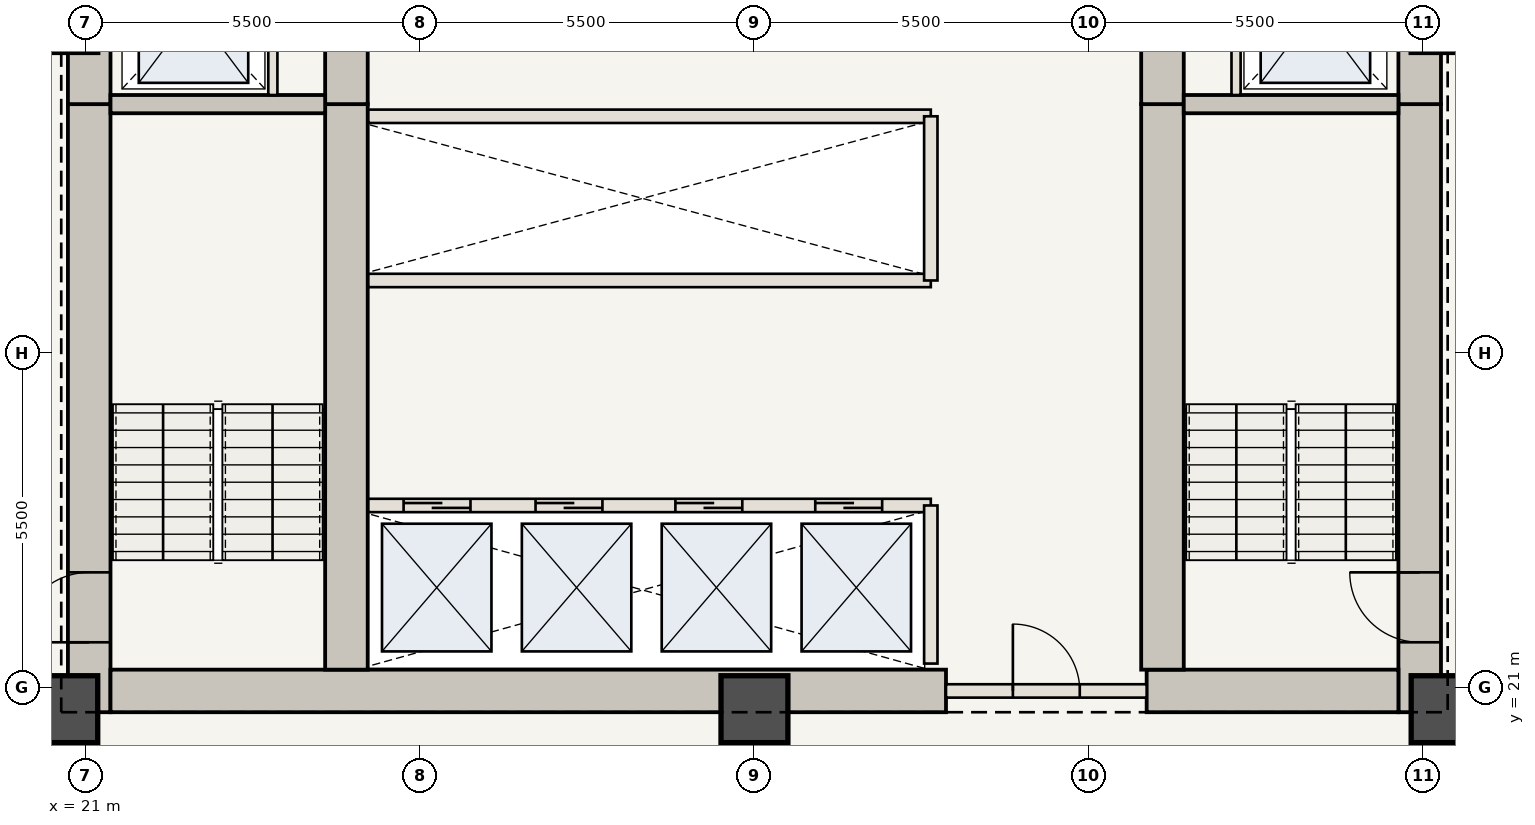
"""IFC4 building model, lengths in metres.
Left out: names, types, materials, properties, quantities, classifications, styles, units other than length and angle.
Written with IfcOpenShell. Run it as: python <this file> out.ifc"""

import sys

from ifc_helpers import new_model, si_unit, direction, frame, frame_2d, origin, origin_2d, place, context, subcontext, project, spatial, rectangle, extrude, element, fill, save


model = new_model("IFC4")
c1 = context("Model", 3, precision=1e-05, world=origin(), true_north=direction((0.0, 1.0)))
c2 = subcontext(c1, "Body", "Model", "MODEL_VIEW")
j1 = project(units=[si_unit("LENGTHUNIT", "METRE"), si_unit("PLANEANGLEUNIT", "RADIAN")], contexts=[c1])
p1 = place(None, origin())
s1 = spatial("IfcSite", under=j1, at=p1, CompositionType="ELEMENT")
p2 = place(p1, origin())
s2 = spatial("IfcBuilding", under=s1, at=p2, CompositionType="ELEMENT")
p3 = place(p2, frame((0.0, 0.0, 70.35)))
s3 = spatial("IfcBuildingStorey", under=s2, at=p3, CompositionType="ELEMENT", Elevation=70.35)
p4 = place(p3, frame((21.06, 20.6, 0.0), z_axis=(0.0, 0.0, 1.0), x_axis=(0.0, 1.0, 0.0)))
e1 = element("IfcWall", 1, at=p4, inside=s3, PredefinedType="SHEAR", context=c2, shape_type="SweptSolid", body=[
    extrude(rectangle(XDim=10.0, YDim=0.7, at=frame_2d((5.0, 0.0))), origin(), (0.0, 0.0, 1.0), 3.5),
])
p5 = place(p4, frame((1.15, 0.0, 0.0)))
e2 = element("IfcOpeningElement", 2, at=p5, cuts=e1, PredefinedType="OPENING", context=c2, shape_type="SweptSolid", body=[
    extrude(rectangle(XDim=1.15, YDim=2.15, at=frame_2d((0.575, 1.075))), frame((0.0, 0.36, 0.0), z_axis=(0.0, -1.0, 0.0), x_axis=(1.0, 0.0, 0.0)), (0.0, 0.0, 1.0), 0.72),
])
p6 = place(p3, frame((21.06, 30.6, 0.0), z_axis=(0.0, 0.0, 1.0), x_axis=(0.0, 1.0, 0.0)))
e3 = element("IfcWall", 3, at=p6, inside=s3, PredefinedType="SHEAR", context=c2, shape_type="SweptSolid", body=[
    extrude(rectangle(XDim=12.75, YDim=0.7, at=frame_2d((6.375, 0.0))), origin(), (0.0, 0.0, 1.0), 3.5),
])
p7 = place(p6, frame((4.2, 0.0, 0.0)))
e4 = element("IfcOpeningElement", 4, at=p7, cuts=e3, PredefinedType="OPENING", context=c2, shape_type="SweptSolid", body=[
    extrude(rectangle(XDim=1.1, YDim=2.15, at=frame_2d((0.55, 1.075))), frame((0.0, 0.36, 0.0), z_axis=(0.0, -1.0, 0.0), x_axis=(1.0, 0.0, 0.0)), (0.0, 0.0, 1.0), 0.72),
])
p8 = place(p6, frame((9.2, 0.0, 0.0)))
e5 = element("IfcOpeningElement", 5, at=p8, cuts=e3, PredefinedType="OPENING", context=c2, shape_type="SweptSolid", body=[
    extrude(rectangle(XDim=0.92, YDim=2.1, at=frame_2d((0.46, 1.05))), frame((0.0, 0.36, 0.0), z_axis=(0.0, -1.0, 0.0), x_axis=(1.0, 0.0, 0.0)), (0.0, 0.0, 1.0), 0.72),
])
p9 = place(p3, frame((42.94, 20.6, 0.0), z_axis=(0.0, 0.0, 1.0), x_axis=(0.0, 1.0, 0.0)))
e6 = element("IfcWall", 6, at=p9, inside=s3, PredefinedType="SHEAR", context=c2, shape_type="SweptSolid", body=[
    extrude(rectangle(XDim=10.0, YDim=0.7, at=frame_2d((5.0, 0.0))), origin(), (0.0, 0.0, 1.0), 3.5),
])
p10 = place(p9, frame((1.15, 0.0, 0.0)))
e7 = element("IfcOpeningElement", 7, at=p10, cuts=e6, PredefinedType="OPENING", context=c2, shape_type="SweptSolid", body=[
    extrude(rectangle(XDim=1.15, YDim=2.15, at=frame_2d((0.575, 1.075))), frame((0.0, 0.36, 0.0), z_axis=(0.0, -1.0, 0.0), x_axis=(1.0, 0.0, 0.0)), (0.0, 0.0, 1.0), 0.72),
])
p11 = place(p3, frame((42.94, 30.6, 0.0), z_axis=(0.0, 0.0, 1.0), x_axis=(0.0, 1.0, 0.0)))
e8 = element("IfcWall", 8, at=p11, inside=s3, PredefinedType="SHEAR", context=c2, shape_type="SweptSolid", body=[
    extrude(rectangle(XDim=12.75, YDim=0.7, at=frame_2d((6.375, 0.0))), origin(), (0.0, 0.0, 1.0), 3.5),
])
p12 = place(p11, frame((4.2, 0.0, 0.0)))
e9 = element("IfcOpeningElement", 9, at=p12, cuts=e8, PredefinedType="OPENING", context=c2, shape_type="SweptSolid", body=[
    extrude(rectangle(XDim=1.1, YDim=2.15, at=frame_2d((0.55, 1.075))), frame((0.0, 0.36, 0.0), z_axis=(0.0, -1.0, 0.0), x_axis=(1.0, 0.0, 0.0)), (0.0, 0.0, 1.0), 0.72),
])
p13 = place(p11, frame((8.05, 0.0, 0.0)))
e10 = element("IfcOpeningElement", 10, at=p13, cuts=e8, PredefinedType="OPENING", context=c2, shape_type="SweptSolid", body=[
    extrude(rectangle(XDim=0.88, YDim=2.1, at=frame_2d((0.44, 1.05))), frame((0.0, 0.36, 0.0), z_axis=(0.0, -1.0, 0.0), x_axis=(1.0, 0.0, 0.0)), (0.0, 0.0, 1.0), 0.72),
])
p14 = place(p11, frame((9.45, 0.0, 0.0)))
e11 = element("IfcOpeningElement", 11, at=p14, cuts=e8, PredefinedType="OPENING", context=c2, shape_type="SweptSolid", body=[
    extrude(rectangle(XDim=0.88, YDim=2.1, at=frame_2d((0.44, 1.05))), frame((0.0, 0.36, 0.0), z_axis=(0.0, -1.0, 0.0), x_axis=(1.0, 0.0, 0.0)), (0.0, 0.0, 1.0), 0.72),
])
p15 = place(p11, frame((10.85, 0.0, 0.0)))
e12 = element("IfcOpeningElement", 12, at=p15, cuts=e8, PredefinedType="OPENING", context=c2, shape_type="SweptSolid", body=[
    extrude(rectangle(XDim=0.88, YDim=2.1, at=frame_2d((0.44, 1.05))), frame((0.0, 0.36, 0.0), z_axis=(0.0, -1.0, 0.0), x_axis=(1.0, 0.0, 0.0)), (0.0, 0.0, 1.0), 0.72),
])
p16 = place(p3, frame((21.41, 20.95, 0.0), z_axis=(0.0, 0.0, 1.0), x_axis=(1.0, 0.0, 0.0)))
e13 = element("IfcWall", 13, at=p16, inside=s3, PredefinedType="SHEAR", context=c2, shape_type="SweptSolid", body=[
    extrude(rectangle(XDim=13.74, YDim=0.7, at=frame_2d((6.87, 0.0))), origin(), (0.0, 0.0, 1.0), 3.5),
])
p17 = place(p3, frame((38.45, 20.95, 0.0), z_axis=(0.0, 0.0, 1.0), x_axis=(1.0, 0.0, 0.0)))
e14 = element("IfcWall", 14, at=p17, inside=s3, PredefinedType="SHEAR", context=c2, shape_type="SweptSolid", body=[
    extrude(rectangle(XDim=4.14, YDim=0.7, at=frame_2d((2.07, 0.0))), origin(), (0.0, 0.0, 1.0), 3.5),
])
p18 = place(p3, frame((25.29, 21.3, 0.0), z_axis=(0.0, 0.0, 1.0), x_axis=(0.0, 1.0, 0.0)))
e15 = element("IfcWall", 15, at=p18, inside=s3, PredefinedType="SHEAR", context=c2, shape_type="SweptSolid", body=[
    extrude(rectangle(XDim=9.3, YDim=0.7, at=frame_2d((4.65, 0.0))), origin(), (0.0, 0.0, 1.0), 3.5),
])
p19 = place(p3, frame((25.29, 30.6, 0.0), z_axis=(0.0, 0.0, 1.0), x_axis=(0.0, 1.0, 0.0)))
e16 = element("IfcWall", 16, at=p19, inside=s3, PredefinedType="SHEAR", context=c2, shape_type="SweptSolid", body=[
    extrude(rectangle(XDim=12.05, YDim=0.7, at=frame_2d((6.025, 0.0))), origin(), (0.0, 0.0, 1.0), 3.5),
])
p20 = place(p19, frame((6.25, 0.0, 0.0)))
e17 = element("IfcOpeningElement", 17, at=p20, cuts=e16, PredefinedType="OPENING", context=c2, shape_type="SweptSolid", body=[
    extrude(rectangle(XDim=1.1, YDim=2.15, at=frame_2d((0.55, 1.075))), frame((0.0, 0.36, 0.0), z_axis=(0.0, -1.0, 0.0), x_axis=(1.0, 0.0, 0.0)), (0.0, 0.0, 1.0), 0.72),
])
p21 = place(p3, frame((38.71, 21.3, 0.0), z_axis=(0.0, 0.0, 1.0), x_axis=(0.0, 1.0, 0.0)))
e18 = element("IfcWall", 18, at=p21, inside=s3, PredefinedType="SHEAR", context=c2, shape_type="SweptSolid", body=[
    extrude(rectangle(XDim=9.3, YDim=0.7, at=frame_2d((4.65, 0.0))), origin(), (0.0, 0.0, 1.0), 3.5),
])
p22 = place(p3, frame((38.71, 30.6, 0.0), z_axis=(0.0, 0.0, 1.0), x_axis=(0.0, 1.0, 0.0)))
e19 = element("IfcWall", 19, at=p22, inside=s3, PredefinedType="SHEAR", context=c2, shape_type="SweptSolid", body=[
    extrude(rectangle(XDim=12.05, YDim=0.7, at=frame_2d((6.025, 0.0))), origin(), (0.0, 0.0, 1.0), 3.5),
])
for number, where, z_axis, x_axis in (
    (20, (20.65, 20.65, 0.0), (0.0, 0.0, 1.0), (1.0, 0.0, 0.0)),
    (21, (32.0, 20.65, 0.0), (0.0, 0.0, 1.0), (1.0, 0.0, 0.0)),
    (22, (43.35, 20.65, 0.0), (0.0, 0.0, 1.0), (1.0, 0.0, 0.0)),
):
    element("IfcColumn", number, at=place(p3, frame(where, z_axis=z_axis, x_axis=x_axis)), inside=s3, PredefinedType="COLUMN", context=c2, shape_type="SweptSolid", body=[
        extrude(rectangle(XDim=1.1, YDim=1.1, at=origin_2d()), origin(), (0.0, 0.0, 1.0), 3.5),
    ])
for number, where, z_axis, x_axis in (
    (23, (21.41, 30.6, 0.0), (0.0, 0.0, 1.0), (1.0, 0.0, 0.0)),
    (24, (39.06, 30.6, 0.0), (0.0, 0.0, 1.0), (1.0, 0.0, 0.0)),
):
    element("IfcWall", number, at=place(p3, frame(where, z_axis=z_axis, x_axis=x_axis)), inside=s3, PredefinedType="SHEAR", context=c2, shape_type="SweptSolid", body=[
        extrude(rectangle(XDim=3.53, YDim=0.3, at=frame_2d((1.765, 0.0))), origin(), (0.0, 0.0, 1.0), 3.32),
    ])
for number, where, z_axis, x_axis in (
    (25, (24.08, 30.75, 0.0), (0.0, 0.0, 1.0), (0.0, 1.0, 0.0)),
    (26, (39.92, 30.75, 0.0), (0.0, 0.0, 1.0), (0.0, 1.0, 0.0)),
):
    element("IfcWall", number, at=place(p3, frame(where, z_axis=z_axis, x_axis=x_axis)), inside=s3, PredefinedType="STANDARD", context=c2, shape_type="SweptSolid", body=[
        extrude(rectangle(XDim=2.65, YDim=0.15, at=frame_2d((1.325, 0.0))), origin(), (0.0, 0.0, 1.0), 3.32),
    ])
p23 = place(p3, frame((35.15, 20.95, 0.0), z_axis=(0.0, 0.0, 1.0), x_axis=(1.0, 0.0, 0.0)))
e27 = element("IfcWall", 27, at=p23, inside=s3, PredefinedType="STANDARD", context=c2, shape_type="SweptSolid", body=[
    extrude(rectangle(XDim=3.3, YDim=0.22, at=frame_2d((1.65, 0.0))), origin(), (0.0, 0.0, 1.0), 3.32),
])
p24 = place(p23, frame((1.1, 0.0, 0.0)))
e28 = element("IfcOpeningElement", 28, at=p24, cuts=e27, PredefinedType="OPENING", context=c2, shape_type="SweptSolid", body=[
    extrude(rectangle(XDim=1.1, YDim=2.15, at=frame_2d((0.55, 1.075))), frame((0.0, 0.12, 0.0), z_axis=(0.0, -1.0, 0.0), x_axis=(1.0, 0.0, 0.0)), (0.0, 0.0, 1.0), 0.24),
])
p25 = place(p3, frame((25.65, 24.0, 0.0), z_axis=(0.0, 0.0, 1.0), x_axis=(1.0, 0.0, 0.0)))
e29 = element("IfcWall", 29, at=p25, inside=s3, PredefinedType="STANDARD", context=c2, shape_type="SweptSolid", body=[
    extrude(rectangle(XDim=9.25, YDim=0.22, at=frame_2d((4.625, 0.0))), origin(), (0.0, 0.0, 1.0), 3.32),
])
p26 = place(p25, frame((0.58, 0.0, 0.0)))
e30 = element("IfcOpeningElement", 30, at=p26, cuts=e29, PredefinedType="OPENING", context=c2, shape_type="SweptSolid", body=[
    extrude(rectangle(XDim=1.1, YDim=2.15, at=frame_2d((0.55, 1.075))), frame((0.0, 0.12, 0.0), z_axis=(0.0, -1.0, 0.0), x_axis=(1.0, 0.0, 0.0)), (0.0, 0.0, 1.0), 0.24),
])
p27 = place(p25, frame((2.75, 0.0, 0.0)))
e31 = element("IfcOpeningElement", 31, at=p27, cuts=e29, PredefinedType="OPENING", context=c2, shape_type="SweptSolid", body=[
    extrude(rectangle(XDim=1.1, YDim=2.15, at=frame_2d((0.55, 1.075))), frame((0.0, 0.12, 0.0), z_axis=(0.0, -1.0, 0.0), x_axis=(1.0, 0.0, 0.0)), (0.0, 0.0, 1.0), 0.24),
])
p28 = place(p25, frame((5.05, 0.0, 0.0)))
e32 = element("IfcOpeningElement", 32, at=p28, cuts=e29, PredefinedType="OPENING", context=c2, shape_type="SweptSolid", body=[
    extrude(rectangle(XDim=1.1, YDim=2.15, at=frame_2d((0.55, 1.075))), frame((0.0, 0.12, 0.0), z_axis=(0.0, -1.0, 0.0), x_axis=(1.0, 0.0, 0.0)), (0.0, 0.0, 1.0), 0.24),
])
p29 = place(p25, frame((7.35, 0.0, 0.0)))
e33 = element("IfcOpeningElement", 33, at=p29, cuts=e29, PredefinedType="OPENING", context=c2, shape_type="SweptSolid", body=[
    extrude(rectangle(XDim=1.1, YDim=2.15, at=frame_2d((0.55, 1.075))), frame((0.0, 0.12, 0.0), z_axis=(0.0, -1.0, 0.0), x_axis=(1.0, 0.0, 0.0)), (0.0, 0.0, 1.0), 0.24),
])
p30 = place(p3, frame((34.9, 21.4, 0.0), z_axis=(0.0, 0.0, 1.0), x_axis=(0.0, 1.0, 0.0)))
e34 = element("IfcWall", 34, at=p30, inside=s3, PredefinedType="STANDARD", context=c2, shape_type="SweptSolid", body=[
    extrude(rectangle(XDim=2.6, YDim=0.22, at=frame_2d((1.3, 0.0))), origin(), (0.0, 0.0, 1.0), 3.32),
])
for number, where, z_axis, x_axis in (
    (35, (25.65, 27.7, 0.0), (0.0, 0.0, 1.0), (1.0, 0.0, 0.0)),
    (36, (25.65, 30.4, 0.0), (0.0, 0.0, 1.0), (1.0, 0.0, 0.0)),
):
    element("IfcWall", number, at=place(p3, frame(where, z_axis=z_axis, x_axis=x_axis)), inside=s3, PredefinedType="STANDARD", context=c2, shape_type="SweptSolid", body=[
        extrude(rectangle(XDim=9.25, YDim=0.22, at=frame_2d((4.625, 0.0))), origin(), (0.0, 0.0, 1.0), 3.32),
    ])
p31 = place(p3, frame((34.9, 27.7, 0.0), z_axis=(0.0, 0.0, 1.0), x_axis=(0.0, 1.0, 0.0)))
e37 = element("IfcWall", 37, at=p31, inside=s3, PredefinedType="STANDARD", context=c2, shape_type="SweptSolid", body=[
    extrude(rectangle(XDim=2.7, YDim=0.22, at=frame_2d((1.35, 0.0))), origin(), (0.0, 0.0, 1.0), 3.32),
])
p32 = place(p5, origin())
e38 = element("IfcDoor", 38, at=p32, inside=s3, OperationType="SINGLE_SWING_LEFT", PredefinedType="DOOR", context=c2, shape_type="SweptSolid", body=[
    extrude(rectangle(XDim=1.15, YDim=2.15, at=frame_2d((0.575, 1.075))), frame((0.0, 0.025, 0.0), z_axis=(0.0, -1.0, 0.0), x_axis=(1.0, 0.0, 0.0)), (0.0, 0.0, 1.0), 0.05),
])
fill(e2, e38)
p33 = place(p10, origin())
e39 = element("IfcDoor", 39, at=p33, inside=s3, OperationType="SINGLE_SWING_RIGHT", PredefinedType="DOOR", context=c2, shape_type="SweptSolid", body=[
    extrude(rectangle(XDim=1.15, YDim=2.15, at=frame_2d((0.575, 1.075))), frame((0.0, 0.025, 0.0), z_axis=(0.0, -1.0, 0.0), x_axis=(1.0, 0.0, 0.0)), (0.0, 0.0, 1.0), 0.05),
])
fill(e7, e39)
p34 = place(p24, origin())
e40 = element("IfcDoor", 40, at=p34, inside=s3, OperationType="SINGLE_SWING_LEFT", PredefinedType="DOOR", context=c2, shape_type="SweptSolid", body=[
    extrude(rectangle(XDim=1.1, YDim=2.15, at=frame_2d((0.55, 1.075))), frame((0.0, 0.025, 0.0), z_axis=(0.0, -1.0, 0.0), x_axis=(1.0, 0.0, 0.0)), (0.0, 0.0, 1.0), 0.05),
])
fill(e28, e40)
p35 = place(p26, origin())
e41 = element("IfcDoor", 41, at=p35, inside=s3, OperationType="DOUBLE_DOOR_SLIDING", PredefinedType="DOOR", context=c2, shape_type="SweptSolid", body=[
    extrude(rectangle(XDim=1.1, YDim=2.15, at=frame_2d((0.55, 1.075))), frame((0.0, 0.025, 0.0), z_axis=(0.0, -1.0, 0.0), x_axis=(1.0, 0.0, 0.0)), (0.0, 0.0, 1.0), 0.05),
])
fill(e30, e41)
p36 = place(p27, origin())
e42 = element("IfcDoor", 42, at=p36, inside=s3, OperationType="DOUBLE_DOOR_SLIDING", PredefinedType="DOOR", context=c2, shape_type="SweptSolid", body=[
    extrude(rectangle(XDim=1.1, YDim=2.15, at=frame_2d((0.55, 1.075))), frame((0.0, 0.025, 0.0), z_axis=(0.0, -1.0, 0.0), x_axis=(1.0, 0.0, 0.0)), (0.0, 0.0, 1.0), 0.05),
])
fill(e31, e42)
p37 = place(p28, origin())
e43 = element("IfcDoor", 43, at=p37, inside=s3, OperationType="DOUBLE_DOOR_SLIDING", PredefinedType="DOOR", context=c2, shape_type="SweptSolid", body=[
    extrude(rectangle(XDim=1.1, YDim=2.15, at=frame_2d((0.55, 1.075))), frame((0.0, 0.025, 0.0), z_axis=(0.0, -1.0, 0.0), x_axis=(1.0, 0.0, 0.0)), (0.0, 0.0, 1.0), 0.05),
])
fill(e32, e43)
p38 = place(p29, origin())
e44 = element("IfcDoor", 44, at=p38, inside=s3, OperationType="DOUBLE_DOOR_SLIDING", PredefinedType="DOOR", context=c2, shape_type="SweptSolid", body=[
    extrude(rectangle(XDim=1.1, YDim=2.15, at=frame_2d((0.55, 1.075))), frame((0.0, 0.025, 0.0), z_axis=(0.0, -1.0, 0.0), x_axis=(1.0, 0.0, 0.0)), (0.0, 0.0, 1.0), 0.05),
])
fill(e33, e44)
save(model, sys.argv[1])
